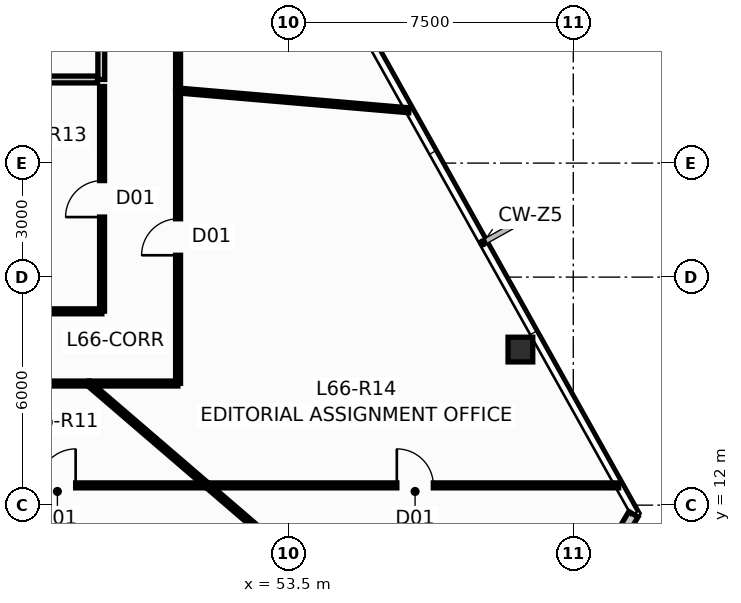
"""IFC4 building model, lengths in metres.
Left out: names, types, materials, properties, quantities, classifications, styles, units other than length and angle.
Written with IfcOpenShell. Run it as: python <this file> out.ifc"""

import sys

from ifc_helpers import new_model, si_unit, direction, frame, frame_2d, origin, origin_2d, place, context, subcontext, project, spatial, rectangle, hollow_rectangle, extrude, source, transform, mapped, element, fill, save


model = new_model("IFC4")
c1 = context("Model", 3, precision=1e-05, world=origin(), true_north=direction((0.0, 1.0)))
c2 = subcontext(c1, "Body", "Model", "MODEL_VIEW")
j1 = project(units=[si_unit("LENGTHUNIT", "METRE"), si_unit("PLANEANGLEUNIT", "RADIAN")], contexts=[c1])
p1 = place(None, origin())
s1 = spatial("IfcSite", under=j1, at=p1, CompositionType="ELEMENT")
p2 = place(p1, origin())
s2 = spatial("IfcBuilding", under=s1, at=p2, CompositionType="ELEMENT")
p3 = place(p2, frame((0.0, 0.0, 251.75)))
s3 = spatial("IfcBuildingStorey", under=s2, at=p3, CompositionType="ELEMENT", Elevation=251.75)
m1 = source(origin(), c2, "Body", "SweptSolid", [
    extrude(hollow_rectangle(XDim=0.65, YDim=0.65, WallThickness=0.04, at=origin_2d()), origin(), (0.0, 0.0, 1.0), 3.651),
])
p4 = place(p3, frame((59.608, 16.094, 0.0), z_axis=(-0.010431780378, -0.021599135014, 0.999712286273), x_axis=(0.900476348161, -0.434904985489, 0.0)))
e1 = element("IfcColumn", 1, at=p4, inside=s3, PredefinedType="COLUMN", context=c2, shape_type="MappedRepresentation", body=[
    mapped(m1, transform((0.0, 0.0, 0.0), scale=1.0)),
])
p5 = place(p3, frame((62.583, 11.76, 0.0), z_axis=(0.0, 0.0, 1.0), x_axis=(-0.508617107287, -0.86099282121, 0.0)))
e2 = element("IfcWall", 2, at=p5, inside=s3, PredefinedType="STANDARD", context=c2, shape_type="SweptSolid", body=[
    extrude(rectangle(XDim=3.446, YDim=0.28, at=frame_2d((1.723, 0.0))), origin(), (0.0, 0.0, 1.0), 3.4),
])
p6 = place(p5, frame((1.12, 0.0, 0.9)))
e3 = element("IfcOpeningElement", 3, at=p6, cuts=e2, PredefinedType="OPENING", context=c2, shape_type="SweptSolid", body=[
    extrude(rectangle(XDim=1.2, YDim=1.65, at=frame_2d((0.6, 0.825))), frame((0.0, 0.152, 0.0), z_axis=(0.0, -1.0, 0.0), x_axis=(1.0, 0.0, 0.0)), (0.0, 0.0, 1.0), 0.304),
])
p7 = place(p3, frame((48.58, 23.2, 0.0), z_axis=(0.0, 0.0, 1.0), x_axis=(0.0, 1.0, 0.0)))
e4 = element("IfcWall", 4, at=p7, inside=s3, PredefinedType="PARTITIONING", context=c2, shape_type="SweptSolid", body=[
    extrude(rectangle(XDim=6.4, YDim=0.18, at=frame_2d((3.2, 0.0))), origin(), (0.0, 0.0, 1.0), 3.129),
])
p8 = place(p7, frame((2.65, 0.0, 0.0)))
e5 = element("IfcOpeningElement", 5, at=p8, cuts=e4, PredefinedType="OPENING", context=c2, shape_type="SweptSolid", body=[
    extrude(rectangle(XDim=1.05, YDim=2.15, at=frame_2d((0.525, 1.075))), frame((0.0, 0.102, 0.0), z_axis=(0.0, -1.0, 0.0), x_axis=(1.0, 0.0, 0.0)), (0.0, 0.0, 1.0), 0.204),
])
p9 = place(p3, frame((45.72, 23.2, 0.0), z_axis=(0.0, 0.0, 1.0), x_axis=(1.0, 0.0, 0.0)))
e6 = element("IfcWall", 6, at=p9, inside=s3, PredefinedType="PARTITIONING", context=c2, shape_type="SweptSolid", body=[
    extrude(rectangle(XDim=2.76, YDim=0.18, at=frame_2d((1.38, 0.0))), origin(), (0.0, 0.0, 1.0), 3.4),
])
p10 = place(p3, frame((51.375, 12.52, 0.0), z_axis=(0.0, 0.0, 1.0), x_axis=(1.0, 0.0, 0.0)))
e7 = element("IfcWall", 7, at=p10, inside=s3, PredefinedType="PARTITIONING", context=c2, shape_type="SweptSolid", body=[
    extrude(rectangle(XDim=10.818, YDim=0.13, at=frame_2d((5.409, 0.0))), origin(), (0.0, 0.0, 1.0), 3.129),
])
p11 = place(p10, frame((4.982, 0.0, 0.0)))
e8 = element("IfcOpeningElement", 8, at=p11, cuts=e7, PredefinedType="OPENING", context=c2, shape_type="SweptSolid", body=[
    extrude(rectangle(XDim=0.96, YDim=2.15, at=frame_2d((0.48, 1.075))), frame((0.0, 0.077, 0.0), z_axis=(0.0, -1.0, 0.0), x_axis=(1.0, 0.0, 0.0)), (0.0, 0.0, 1.0), 0.154),
])
p12 = place(p3, frame((50.6, 22.915, 0.0), z_axis=(0.0, 0.0, 1.0), x_axis=(0.0, 1.0, 0.0)))
e9 = element("IfcWall", 9, at=p12, inside=s3, PredefinedType="PARTITIONING", context=c2, shape_type="SweptSolid", body=[
    extrude(rectangle(XDim=10.312, YDim=0.13, at=frame_2d((5.156, 0.0))), origin(), (0.0, 0.0, 1.0), 3.129),
])
p13 = place(p12, frame((3.6, 0.0, 0.0)))
e10 = element("IfcOpeningElement", 10, at=p13, cuts=e9, PredefinedType="OPENING", context=c2, shape_type="SweptSolid", body=[
    extrude(rectangle(XDim=0.96, YDim=2.15, at=frame_2d((0.48, 1.075))), frame((0.0, 0.077, 0.0), z_axis=(0.0, -1.0, 0.0), x_axis=(1.0, 0.0, 0.0)), (0.0, 0.0, 1.0), 0.154),
])
p14 = place(p3, frame((43.485, 12.52, 0.0), z_axis=(0.0, 0.0, 1.0), x_axis=(1.0, 0.0, 0.0)))
e11 = element("IfcWall", 11, at=p14, inside=s3, PredefinedType="PARTITIONING", context=c2, shape_type="SweptSolid", body=[
    extrude(rectangle(XDim=7.88, YDim=0.13, at=frame_2d((3.94, 0.0))), origin(), (0.0, 0.0, 1.0), 3.129),
])
p15 = place(p14, frame((3.46, 0.0, 0.0)))
e12 = element("IfcOpeningElement", 12, at=p15, cuts=e11, PredefinedType="OPENING", context=c2, shape_type="SweptSolid", body=[
    extrude(rectangle(XDim=0.96, YDim=2.15, at=frame_2d((0.48, 1.075))), frame((0.0, 0.077, 0.0), z_axis=(0.0, -1.0, 0.0), x_axis=(1.0, 0.0, 0.0)), (0.0, 0.0, 1.0), 0.154),
])
p16 = place(p3, frame((50.6, 15.205, 0.0), z_axis=(0.0, 0.0, 1.0), x_axis=(0.0, 1.0, 0.0)))
e13 = element("IfcWall", 13, at=p16, inside=s3, PredefinedType="PARTITIONING", context=c2, shape_type="SweptSolid", body=[
    extrude(rectangle(XDim=7.7, YDim=0.13, at=frame_2d((3.85, 0.0))), origin(), (0.0, 0.0, 1.0), 3.129),
])
p17 = place(p16, frame((3.37, 0.0, 0.0)))
e14 = element("IfcOpeningElement", 14, at=p17, cuts=e13, PredefinedType="OPENING", context=c2, shape_type="SweptSolid", body=[
    extrude(rectangle(XDim=0.96, YDim=2.15, at=frame_2d((0.48, 1.075))), frame((0.0, 0.077, 0.0), z_axis=(0.0, -1.0, 0.0), x_axis=(1.0, 0.0, 0.0)), (0.0, 0.0, 1.0), 0.154),
])
p18 = place(p3, frame((50.605, 22.91, 0.0), z_axis=(0.0, 0.0, 1.0), x_axis=(0.996350739531, -0.085353405534, 0.0)))
e15 = element("IfcWall", 15, at=p18, inside=s3, PredefinedType="PARTITIONING", context=c2, shape_type="SweptSolid", body=[
    extrude(rectangle(XDim=6.093, YDim=0.13, at=frame_2d((3.046, 0.0))), origin(), (0.0, 0.0, 1.0), 3.4),
])
p19 = place(p3, frame((51.374, 12.517, 0.0), z_axis=(0.0, 0.0, 1.0), x_axis=(0.758399794399, -0.651789653075, 0.0)))
e16 = element("IfcWall", 16, at=p19, inside=s3, PredefinedType="PARTITIONING", context=c2, shape_type="SweptSolid", body=[
    extrude(rectangle(XDim=5.938, YDim=0.13, at=frame_2d((2.969, 0.0))), origin(), (0.0, 0.0, 1.0), 2.985),
])
p20 = place(p3, frame((42.205, 15.2, 0.0), z_axis=(0.0, 0.0, 1.0), x_axis=(1.0, 0.0, 0.0)))
e17 = element("IfcWall", 17, at=p20, inside=s3, PredefinedType="PARTITIONING", context=c2, shape_type="SweptSolid", body=[
    extrude(rectangle(XDim=6.04, YDim=0.13, at=frame_2d((3.02, 0.0))), origin(), (0.0, 0.0, 1.0), 3.129),
])
p21 = place(p20, frame((2.54, 0.0, 0.0)))
e18 = element("IfcOpeningElement", 18, at=p21, cuts=e17, PredefinedType="OPENING", context=c2, shape_type="SweptSolid", body=[
    extrude(rectangle(XDim=0.96, YDim=2.15, at=frame_2d((0.48, 1.075))), frame((0.0, 0.077, 0.0), z_axis=(0.0, -1.0, 0.0), x_axis=(1.0, 0.0, 0.0)), (0.0, 0.0, 1.0), 0.154),
])
p22 = place(p3, frame((48.6, 17.105, 0.0), z_axis=(0.0, 0.0, 1.0), x_axis=(0.0, 1.0, 0.0)))
e19 = element("IfcWall", 19, at=p22, inside=s3, PredefinedType="PARTITIONING", context=c2, shape_type="SweptSolid", body=[
    extrude(rectangle(XDim=5.91, YDim=0.13, at=frame_2d((2.955, 0.0))), origin(), (0.0, 0.0, 1.0), 3.4),
])
p23 = place(p22, frame((2.475, 0.0, 0.0)))
e20 = element("IfcOpeningElement", 20, at=p23, cuts=e19, PredefinedType="OPENING", context=c2, shape_type="SweptSolid", body=[
    extrude(rectangle(XDim=0.96, YDim=2.15, at=frame_2d((0.48, 1.075))), frame((0.0, 0.077, 0.0), z_axis=(0.0, -1.0, 0.0), x_axis=(1.0, 0.0, 0.0)), (0.0, 0.0, 1.0), 0.154),
])
p24 = place(p3, frame((48.254, 15.197, 0.0), z_axis=(0.0, 0.0, 1.0), x_axis=(0.758462221085, -0.651717008515, 0.0)))
e21 = element("IfcWall", 21, at=p24, inside=s3, PredefinedType="PARTITIONING", context=c2, shape_type="SweptSolid", body=[
    extrude(rectangle(XDim=4.103, YDim=0.13, at=frame_2d((2.052, 0.0))), origin(), (0.0, 0.0, 1.0), 2.985),
])
p25 = place(p3, frame((46.045, 17.1, 0.0), z_axis=(0.0, 0.0, 1.0), x_axis=(1.0, 0.0, 0.0)))
e22 = element("IfcWall", 22, at=p25, inside=s3, PredefinedType="PARTITIONING", context=c2, shape_type="SweptSolid", body=[
    extrude(rectangle(XDim=2.55, YDim=0.13, at=frame_2d((1.275, 0.0))), origin(), (0.0, 0.0, 1.0), 2.985),
])
p26 = place(p3, frame((48.255, 15.2, 0.0), z_axis=(0.0, 0.0, 1.0), x_axis=(1.0, 0.0, 0.0)))
e23 = element("IfcWall", 23, at=p26, inside=s3, PredefinedType="PARTITIONING", context=c2, shape_type="SweptSolid", body=[
    extrude(rectangle(XDim=2.34, YDim=0.13, at=frame_2d((1.17, 0.0))), origin(), (0.0, 0.0, 1.0), 3.129),
])
p27 = place(p11, origin())
e24 = element("IfcDoor", 24, at=p27, inside=s3, OperationType="SINGLE_SWING_LEFT", PredefinedType="DOOR", context=c2, shape_type="SweptSolid", body=[
    extrude(rectangle(XDim=0.96, YDim=2.15, at=frame_2d((0.48, 1.075))), frame((0.0, 0.025, 0.0), z_axis=(0.0, -1.0, 0.0), x_axis=(1.0, 0.0, 0.0)), (0.0, 0.0, 1.0), 0.05),
])
fill(e8, e24)
p28 = place(p15, origin())
e25 = element("IfcDoor", 25, at=p28, inside=s3, OperationType="SINGLE_SWING_RIGHT", PredefinedType="DOOR", context=c2, shape_type="SweptSolid", body=[
    extrude(rectangle(XDim=0.96, YDim=2.15, at=frame_2d((0.48, 1.075))), frame((0.0, 0.025, 0.0), z_axis=(0.0, -1.0, 0.0), x_axis=(1.0, 0.0, 0.0)), (0.0, 0.0, 1.0), 0.05),
])
fill(e12, e25)
p29 = place(p17, origin())
e26 = element("IfcDoor", 26, at=p29, inside=s3, OperationType="SINGLE_SWING_LEFT", PredefinedType="DOOR", context=c2, shape_type="SweptSolid", body=[
    extrude(rectangle(XDim=0.96, YDim=2.15, at=frame_2d((0.48, 1.075))), frame((0.0, 0.025, 0.0), z_axis=(0.0, -1.0, 0.0), x_axis=(1.0, 0.0, 0.0)), (0.0, 0.0, 1.0), 0.05),
])
fill(e14, e26)
p30 = place(p23, origin())
e27 = element("IfcDoor", 27, at=p30, inside=s3, OperationType="SINGLE_SWING_LEFT", PredefinedType="DOOR", context=c2, shape_type="SweptSolid", body=[
    extrude(rectangle(XDim=0.96, YDim=2.15, at=frame_2d((0.48, 1.075))), frame((0.0, 0.025, 0.0), z_axis=(0.0, -1.0, 0.0), x_axis=(1.0, 0.0, 0.0)), (0.0, 0.0, 1.0), 0.05),
])
fill(e20, e27)
save(model, sys.argv[1])
